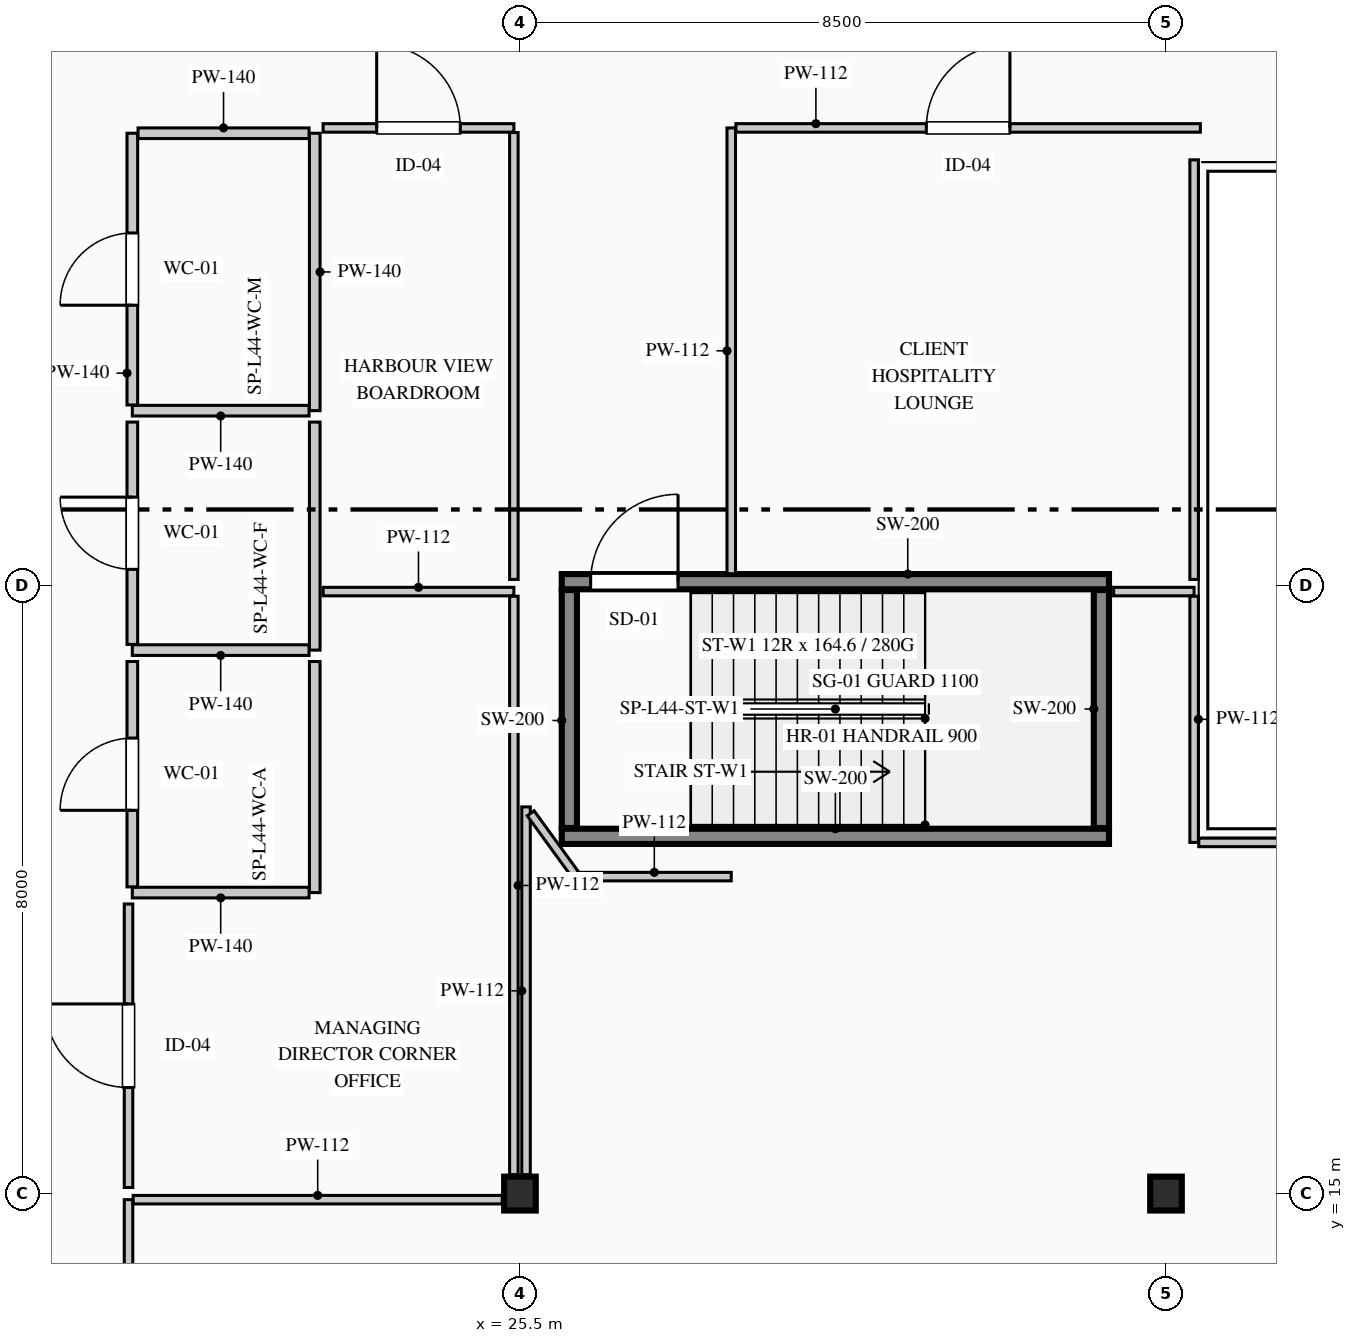
"""IFC4 building model, lengths in metres.
Left out: names, types, materials, properties, quantities, classifications, styles, units other than length and angle.
Written with IfcOpenShell. Run it as: python <this file> out.ifc"""

import sys

from ifc_helpers import new_model, si_unit, direction, frame, frame_2d, origin, origin_2d, place, context, subcontext, project, spatial, rectangle, i_section, extrude, element, fill, save


model = new_model("IFC4")
c1 = context("Model", 3, precision=1e-05, world=origin(), true_north=direction((0.0, 1.0)))
c2 = subcontext(c1, "Body", "Model", "MODEL_VIEW")
j1 = project(units=[si_unit("LENGTHUNIT", "METRE"), si_unit("PLANEANGLEUNIT", "RADIAN")], contexts=[c1])
p1 = place(None, origin())
s1 = spatial("IfcSite", under=j1, at=p1, CompositionType="ELEMENT")
p2 = place(p1, origin())
s2 = spatial("IfcBuilding", under=s1, at=p2, CompositionType="ELEMENT")
p3 = place(p2, frame((0.0, 0.0, 187.7)))
s3 = spatial("IfcBuildingStorey", under=s2, at=p3, CompositionType="ELEMENT", Elevation=187.7)
p4 = place(p3, frame((26.05, 19.7, 0.0), z_axis=(0.0, 0.0, 1.0), x_axis=(1.0, 0.0, 0.0)))
e1 = element("IfcWall", 1, at=p4, inside=s3, PredefinedType="SHEAR", context=c2, shape_type="SweptSolid", body=[
    extrude(rectangle(XDim=7.2, YDim=0.2, at=frame_2d((3.6, 0.0))), origin(), (0.0, 0.0, 1.0), 3.95),
])
p5 = place(p3, frame((26.05, 23.05, 0.0), z_axis=(0.0, 0.0, 1.0), x_axis=(1.0, 0.0, 0.0)))
e2 = element("IfcWall", 2, at=p5, inside=s3, PredefinedType="SHEAR", context=c2, shape_type="SweptSolid", body=[
    extrude(rectangle(XDim=7.2, YDim=0.2, at=frame_2d((3.6, 0.0))), origin(), (0.0, 0.0, 1.0), 3.95),
])
p6 = place(p5, frame((0.38, 0.0, 0.0)))
e3 = element("IfcOpeningElement", 3, at=p6, cuts=e2, PredefinedType="OPENING", context=c2, shape_type="SweptSolid", body=[
    extrude(rectangle(XDim=1.15, YDim=2.2, at=frame_2d((0.575, 1.1))), frame((0.0, 0.11, 0.0), z_axis=(0.0, -1.0, 0.0), x_axis=(1.0, 0.0, 0.0)), (0.0, 0.0, 1.0), 0.22),
])
for number, where, z_axis, x_axis in (
    (4, (26.15, 19.81, 0.0), (0.0, 0.0, 1.0), (0.0, 1.0, 0.0)),
    (5, (33.15, 19.81, 0.0), (0.0, 0.0, 1.0), (0.0, 1.0, 0.0)),
):
    element("IfcWall", number, at=place(p3, frame(where, z_axis=z_axis, x_axis=x_axis)), inside=s3, PredefinedType="SHEAR", context=c2, shape_type="SweptSolid", body=[
        extrude(rectangle(XDim=3.13, YDim=0.2, at=frame_2d((1.565, 0.0))), origin(), (0.0, 0.0, 1.0), 3.95),
    ])
for number, where, z_axis, x_axis in (
    (6, (25.5, 15.0, 0.0), (0.0, 0.0, 1.0), (1.0, 0.0, 0.0)),
    (7, (34.0, 15.0, 0.0), (0.0, 0.0, 1.0), (1.0, 0.0, 0.0)),
):
    element("IfcColumn", number, at=place(p3, frame(where, z_axis=z_axis, x_axis=x_axis)), inside=s3, PredefinedType="COLUMN", context=c2, shape_type="SweptSolid", body=[
        extrude(i_section(OverallWidth=0.416, OverallDepth=0.446, WebThickness=0.039, FlangeThickness=0.063, FilletRadius=0.015, at=origin_2d()), origin(), (0.0, 0.0, 1.0), 3.95),
    ])
p7 = place(p3, frame((22.8, 28.95, 0.0), z_axis=(0.0, 0.0, 1.0), x_axis=(0.0, -1.0, 0.0)))
e8 = element("IfcWall", 8, at=p7, inside=s3, PredefinedType="PARTITIONING", context=c2, shape_type="SweptSolid", body=[
    extrude(rectangle(XDim=3.65, YDim=0.14, at=frame_2d((1.825, 0.0))), origin(), (0.0, 0.0, 1.0), 3.385),
])
p8 = place(p3, frame((22.725, 25.3, 0.0), z_axis=(0.0, 0.0, 1.0), x_axis=(-1.0, 0.0, 0.0)))
e9 = element("IfcWall", 9, at=p8, inside=s3, PredefinedType="PARTITIONING", context=c2, shape_type="SweptSolid", body=[
    extrude(rectangle(XDim=2.325, YDim=0.14, at=frame_2d((1.163, 0.0))), origin(), (0.0, 0.0, 1.0), 3.7),
])
p9 = place(p3, frame((20.4, 25.375, 0.0), z_axis=(0.0, 0.0, 1.0), x_axis=(0.0, 1.0, 0.0)))
e10 = element("IfcWall", 10, at=p9, inside=s3, PredefinedType="PARTITIONING", context=c2, shape_type="SweptSolid", body=[
    extrude(rectangle(XDim=3.575, YDim=0.14, at=frame_2d((1.788, 0.0))), origin(), (0.0, 0.0, 1.0), 3.7),
])
p10 = place(p9, frame((1.312, 0.0, 0.0)))
e11 = element("IfcOpeningElement", 11, at=p10, cuts=e10, PredefinedType="OPENING", context=c2, shape_type="SweptSolid", body=[
    extrude(rectangle(XDim=0.95, YDim=2.15, at=frame_2d((0.475, 1.075))), frame((0.0, 0.08, 0.0), z_axis=(0.0, -1.0, 0.0), x_axis=(1.0, 0.0, 0.0)), (0.0, 0.0, 1.0), 0.16),
])
p11 = place(p3, frame((20.475, 28.95, 0.0), z_axis=(0.0, 0.0, 1.0), x_axis=(1.0, 0.0, 0.0)))
e12 = element("IfcWall", 12, at=p11, inside=s3, PredefinedType="PARTITIONING", context=c2, shape_type="SweptSolid", body=[
    extrude(rectangle(XDim=2.25, YDim=0.14, at=frame_2d((1.125, 0.0))), origin(), (0.0, 0.0, 1.0), 3.7),
])
p12 = place(p3, frame((22.8, 25.15, 0.0), z_axis=(0.0, 0.0, 1.0), x_axis=(0.0, -1.0, 0.0)))
e13 = element("IfcWall", 13, at=p12, inside=s3, PredefinedType="PARTITIONING", context=c2, shape_type="SweptSolid", body=[
    extrude(rectangle(XDim=3.0, YDim=0.14, at=frame_2d((1.5, 0.0))), origin(), (0.0, 0.0, 1.0), 3.385),
])
p13 = place(p3, frame((22.725, 22.15, 0.0), z_axis=(0.0, 0.0, 1.0), x_axis=(-1.0, 0.0, 0.0)))
e14 = element("IfcWall", 14, at=p13, inside=s3, PredefinedType="PARTITIONING", context=c2, shape_type="SweptSolid", body=[
    extrude(rectangle(XDim=2.325, YDim=0.14, at=frame_2d((1.163, 0.0))), origin(), (0.0, 0.0, 1.0), 3.7),
])
p14 = place(p3, frame((20.4, 22.225, 0.0), z_axis=(0.0, 0.0, 1.0), x_axis=(0.0, 1.0, 0.0)))
e15 = element("IfcWall", 15, at=p14, inside=s3, PredefinedType="PARTITIONING", context=c2, shape_type="SweptSolid", body=[
    extrude(rectangle(XDim=2.925, YDim=0.14, at=frame_2d((1.462, 0.0))), origin(), (0.0, 0.0, 1.0), 3.7),
])
p15 = place(p14, frame((0.988, 0.0, 0.0)))
e16 = element("IfcOpeningElement", 16, at=p15, cuts=e15, PredefinedType="OPENING", context=c2, shape_type="SweptSolid", body=[
    extrude(rectangle(XDim=0.95, YDim=2.15, at=frame_2d((0.475, 1.075))), frame((0.0, 0.08, 0.0), z_axis=(0.0, -1.0, 0.0), x_axis=(1.0, 0.0, 0.0)), (0.0, 0.0, 1.0), 0.16),
])
p16 = place(p3, frame((22.8, 22.0, 0.0), z_axis=(0.0, 0.0, 1.0), x_axis=(0.0, -1.0, 0.0)))
e17 = element("IfcWall", 17, at=p16, inside=s3, PredefinedType="PARTITIONING", context=c2, shape_type="SweptSolid", body=[
    extrude(rectangle(XDim=3.04, YDim=0.14, at=frame_2d((1.52, 0.0))), origin(), (0.0, 0.0, 1.0), 3.385),
])
p17 = place(p3, frame((22.725, 18.96, 0.0), z_axis=(0.0, 0.0, 1.0), x_axis=(-1.0, 0.0, 0.0)))
e18 = element("IfcWall", 18, at=p17, inside=s3, PredefinedType="PARTITIONING", context=c2, shape_type="SweptSolid", body=[
    extrude(rectangle(XDim=2.325, YDim=0.14, at=frame_2d((1.163, 0.0))), origin(), (0.0, 0.0, 1.0), 3.7),
])
p18 = place(p3, frame((20.4, 19.035, 0.0), z_axis=(0.0, 0.0, 1.0), x_axis=(0.0, 1.0, 0.0)))
e19 = element("IfcWall", 19, at=p18, inside=s3, PredefinedType="PARTITIONING", context=c2, shape_type="SweptSolid", body=[
    extrude(rectangle(XDim=2.965, YDim=0.14, at=frame_2d((1.482, 0.0))), origin(), (0.0, 0.0, 1.0), 3.7),
])
p19 = place(p18, frame((1.008, 0.0, 0.0)))
e20 = element("IfcOpeningElement", 20, at=p19, cuts=e19, PredefinedType="OPENING", context=c2, shape_type="SweptSolid", body=[
    extrude(rectangle(XDim=0.95, YDim=2.15, at=frame_2d((0.475, 1.075))), frame((0.0, 0.08, 0.0), z_axis=(0.0, -1.0, 0.0), x_axis=(1.0, 0.0, 0.0)), (0.0, 0.0, 1.0), 0.16),
])
p20 = place(p3, frame((20.35, 11.831, 0.0), z_axis=(0.0, 0.0, 1.0), x_axis=(0.0, 1.0, 0.0)))
e21 = element("IfcWall", 21, at=p20, inside=s3, PredefinedType="PARTITIONING", context=c2, shape_type="SweptSolid", body=[
    extrude(rectangle(XDim=3.089, YDim=0.112, at=frame_2d((1.544, 0.0))), origin(), (0.0, 0.0, 1.0), 3.7),
])
p21 = place(p3, frame((20.411, 14.92, 0.0), z_axis=(0.0, 0.0, 1.0), x_axis=(1.0, 0.0, 0.0)))
e22 = element("IfcWall", 22, at=p21, inside=s3, PredefinedType="PARTITIONING", context=c2, shape_type="SweptSolid", body=[
    extrude(rectangle(XDim=4.856, YDim=0.112, at=frame_2d((2.428, 0.0))), origin(), (0.0, 0.0, 1.0), 3.085),
])
p22 = place(p3, frame((25.58, 15.248, 0.0), z_axis=(0.0, 0.0, 1.0), x_axis=(0.0, 1.0, 0.0)))
e23 = element("IfcWall", 23, at=p22, inside=s3, PredefinedType="PARTITIONING", context=c2, shape_type="SweptSolid", body=[
    extrude(rectangle(XDim=4.839, YDim=0.112, at=frame_2d((2.419, 0.0))), origin(), (0.0, 0.0, 1.0), 2.885),
])
p23 = place(p3, frame((25.641, 20.003, 0.0), z_axis=(0.0, 0.0, 1.0), x_axis=(0.588143517869, -0.808756577957, 0.0)))
e24 = element("IfcWall", 24, at=p23, inside=s3, PredefinedType="PARTITIONING", context=c2, shape_type="SweptSolid", body=[
    extrude(rectangle(XDim=1.03, YDim=0.112, at=frame_2d((0.515, 0.0))), origin(), (0.0, 0.0, 1.0), 3.7),
])
p24 = place(p3, frame((26.256, 19.17, 0.0), z_axis=(0.0, 0.0, 1.0), x_axis=(1.0, 0.0, 0.0)))
e25 = element("IfcWall", 25, at=p24, inside=s3, PredefinedType="PARTITIONING", context=c2, shape_type="SweptSolid", body=[
    extrude(rectangle(XDim=2.024, YDim=0.112, at=frame_2d((1.012, 0.0))), origin(), (0.0, 0.0, 1.0), 3.385),
])
p25 = place(p3, frame((33.311, 22.92, 0.0), z_axis=(0.0, 0.0, 1.0), x_axis=(1.0, 0.0, 0.0)))
e26 = element("IfcWall", 26, at=p25, inside=s3, PredefinedType="PARTITIONING", context=c2, shape_type="SweptSolid", body=[
    extrude(rectangle(XDim=1.059, YDim=0.112, at=frame_2d((0.53, 0.0))), origin(), (0.0, 0.0, 1.0), 3.7),
])
p26 = place(p3, frame((34.37, 22.859, 0.0), z_axis=(0.0, 0.0, 1.0), x_axis=(0.0, -1.0, 0.0)))
e27 = element("IfcWall", 27, at=p26, inside=s3, PredefinedType="PARTITIONING", context=c2, shape_type="SweptSolid", body=[
    extrude(rectangle(XDim=3.239, YDim=0.112, at=frame_2d((1.619, 0.0))), origin(), (0.0, 0.0, 1.0), 3.7),
])
p27 = place(p3, frame((34.431, 19.62, 0.0), z_axis=(0.0, 0.0, 1.0), x_axis=(1.0, 0.0, 0.0)))
e28 = element("IfcWall", 28, at=p27, inside=s3, PredefinedType="PARTITIONING", context=c2, shape_type="SweptSolid", body=[
    extrude(rectangle(XDim=8.726, YDim=0.112, at=frame_2d((4.363, 0.0))), origin(), (0.0, 0.0, 1.0), 3.7),
])
p28 = place(p3, frame((22.91, 22.92, 0.0), z_axis=(0.0, 0.0, 1.0), x_axis=(1.0, 0.0, 0.0)))
e29 = element("IfcWall", 29, at=p28, inside=s3, PredefinedType="PARTITIONING", context=c2, shape_type="SweptSolid", body=[
    extrude(rectangle(XDim=2.51, YDim=0.112, at=frame_2d((1.255, 0.0))), origin(), (0.0, 0.0, 1.0), 3.7),
])
p29 = place(p3, frame((25.42, 22.859, 0.0), z_axis=(0.0, 0.0, 1.0), x_axis=(0.0, -1.0, 0.0)))
e30 = element("IfcWall", 30, at=p29, inside=s3, PredefinedType="PARTITIONING", context=c2, shape_type="SweptSolid", body=[
    extrude(rectangle(XDim=7.611, YDim=0.112, at=frame_2d((3.805, 0.0))), origin(), (0.0, 0.0, 1.0), 2.885),
])
p30 = place(p3, frame((20.35, 15.08, 0.0), z_axis=(0.0, 0.0, 1.0), x_axis=(0.0, 1.0, 0.0)))
e31 = element("IfcWall", 31, at=p30, inside=s3, PredefinedType="PARTITIONING", context=c2, shape_type="SweptSolid", body=[
    extrude(rectangle(XDim=3.73, YDim=0.112, at=frame_2d((1.865, 0.0))), origin(), (0.0, 0.0, 1.0), 3.7),
])
p31 = place(p30, frame((1.315, 0.0, 0.0)))
e32 = element("IfcOpeningElement", 32, at=p31, cuts=e31, PredefinedType="OPENING", context=c2, shape_type="SweptSolid", body=[
    extrude(rectangle(XDim=1.1, YDim=2.2, at=frame_2d((0.55, 1.1))), frame((0.0, 0.066, 0.0), z_axis=(0.0, -1.0, 0.0), x_axis=(1.0, 0.0, 0.0)), (0.0, 0.0, 1.0), 0.132),
])
p32 = place(p3, frame((22.91, 29.02, 0.0), z_axis=(0.0, 0.0, 1.0), x_axis=(1.0, 0.0, 0.0)))
e33 = element("IfcWall", 33, at=p32, inside=s3, PredefinedType="PARTITIONING", context=c2, shape_type="SweptSolid", body=[
    extrude(rectangle(XDim=2.51, YDim=0.112, at=frame_2d((1.255, 0.0))), origin(), (0.0, 0.0, 1.0), 3.7),
])
p33 = place(p32, frame((0.705, 0.0, 0.0)))
e34 = element("IfcOpeningElement", 34, at=p33, cuts=e33, PredefinedType="OPENING", context=c2, shape_type="SweptSolid", body=[
    extrude(rectangle(XDim=1.1, YDim=2.2, at=frame_2d((0.55, 1.1))), frame((0.0, 0.066, 0.0), z_axis=(0.0, -1.0, 0.0), x_axis=(1.0, 0.0, 0.0)), (0.0, 0.0, 1.0), 0.132),
])
p34 = place(p3, frame((25.42, 28.959, 0.0), z_axis=(0.0, 0.0, 1.0), x_axis=(0.0, -1.0, 0.0)))
e35 = element("IfcWall", 35, at=p34, inside=s3, PredefinedType="PARTITIONING", context=c2, shape_type="SweptSolid", body=[
    extrude(rectangle(XDim=5.879, YDim=0.112, at=frame_2d((2.939, 0.0))), origin(), (0.0, 0.0, 1.0), 2.885),
])
p35 = place(p3, frame((34.37, 28.6, 0.0), z_axis=(0.0, 0.0, 1.0), x_axis=(0.0, -1.0, 0.0)))
e36 = element("IfcWall", 36, at=p35, inside=s3, PredefinedType="PARTITIONING", context=c2, shape_type="SweptSolid", body=[
    extrude(rectangle(XDim=5.52, YDim=0.112, at=frame_2d((2.76, 0.0))), origin(), (0.0, 0.0, 1.0), 3.7),
])
p36 = place(p3, frame((28.28, 23.155, 0.0), z_axis=(0.0, 0.0, 1.0), x_axis=(0.0, 1.0, 0.0)))
e37 = element("IfcWall", 37, at=p36, inside=s3, PredefinedType="PARTITIONING", context=c2, shape_type="SweptSolid", body=[
    extrude(rectangle(XDim=5.865, YDim=0.112, at=frame_2d((2.933, 0.0))), origin(), (0.0, 0.0, 1.0), 3.7),
])
p37 = place(p3, frame((28.341, 29.02, 0.0), z_axis=(0.0, 0.0, 1.0), x_axis=(1.0, 0.0, 0.0)))
e38 = element("IfcWall", 38, at=p37, inside=s3, PredefinedType="PARTITIONING", context=c2, shape_type="SweptSolid", body=[
    extrude(rectangle(XDim=6.111, YDim=0.112, at=frame_2d((3.055, 0.0))), origin(), (0.0, 0.0, 1.0), 3.385),
])
p38 = place(p37, frame((2.506, 0.0, 0.0)))
e39 = element("IfcOpeningElement", 39, at=p38, cuts=e38, PredefinedType="OPENING", context=c2, shape_type="SweptSolid", body=[
    extrude(rectangle(XDim=1.1, YDim=2.2, at=frame_2d((0.55, 1.1))), frame((0.0, 0.066, 0.0), z_axis=(0.0, -1.0, 0.0), x_axis=(1.0, 0.0, 0.0)), (0.0, 0.0, 1.0), 0.132),
])
p39 = place(p6, origin())
e40 = element("IfcDoor", 40, at=p39, inside=s3, OperationType="SINGLE_SWING_RIGHT", PredefinedType="DOOR", context=c2, shape_type="SweptSolid", body=[
    extrude(rectangle(XDim=1.15, YDim=2.2, at=frame_2d((0.575, 1.1))), frame((0.0, 0.025, 0.0), z_axis=(0.0, -1.0, 0.0), x_axis=(1.0, 0.0, 0.0)), (0.0, 0.0, 1.0), 0.05),
])
fill(e3, e40)
p40 = place(p10, origin())
e41 = element("IfcDoor", 41, at=p40, inside=s3, OperationType="SINGLE_SWING_LEFT", PredefinedType="DOOR", context=c2, shape_type="SweptSolid", body=[
    extrude(rectangle(XDim=0.95, YDim=2.15, at=frame_2d((0.475, 1.075))), frame((0.0, 0.025, 0.0), z_axis=(0.0, -1.0, 0.0), x_axis=(1.0, 0.0, 0.0)), (0.0, 0.0, 1.0), 0.05),
])
fill(e11, e41)
p41 = place(p15, origin())
e42 = element("IfcDoor", 42, at=p41, inside=s3, OperationType="SINGLE_SWING_RIGHT", PredefinedType="DOOR", context=c2, shape_type="SweptSolid", body=[
    extrude(rectangle(XDim=0.95, YDim=2.15, at=frame_2d((0.475, 1.075))), frame((0.0, 0.025, 0.0), z_axis=(0.0, -1.0, 0.0), x_axis=(1.0, 0.0, 0.0)), (0.0, 0.0, 1.0), 0.05),
])
fill(e16, e42)
p42 = place(p19, origin())
e43 = element("IfcDoor", 43, at=p42, inside=s3, OperationType="SINGLE_SWING_LEFT", PredefinedType="DOOR", context=c2, shape_type="SweptSolid", body=[
    extrude(rectangle(XDim=0.95, YDim=2.15, at=frame_2d((0.475, 1.075))), frame((0.0, 0.025, 0.0), z_axis=(0.0, -1.0, 0.0), x_axis=(1.0, 0.0, 0.0)), (0.0, 0.0, 1.0), 0.05),
])
fill(e20, e43)
p43 = place(p31, origin())
e44 = element("IfcDoor", 44, at=p43, inside=s3, OperationType="SINGLE_SWING_RIGHT", PredefinedType="DOOR", context=c2, shape_type="SweptSolid", body=[
    extrude(rectangle(XDim=1.1, YDim=2.2, at=frame_2d((0.55, 1.1))), frame((0.0, 0.025, 0.0), z_axis=(0.0, -1.0, 0.0), x_axis=(1.0, 0.0, 0.0)), (0.0, 0.0, 1.0), 0.05),
])
fill(e32, e44)
p44 = place(p33, origin())
e45 = element("IfcDoor", 45, at=p44, inside=s3, OperationType="SINGLE_SWING_LEFT", PredefinedType="DOOR", context=c2, shape_type="SweptSolid", body=[
    extrude(rectangle(XDim=1.1, YDim=2.2, at=frame_2d((0.55, 1.1))), frame((0.0, 0.025, 0.0), z_axis=(0.0, -1.0, 0.0), x_axis=(1.0, 0.0, 0.0)), (0.0, 0.0, 1.0), 0.05),
])
fill(e34, e45)
p45 = place(p38, origin())
e46 = element("IfcDoor", 46, at=p45, inside=s3, OperationType="SINGLE_SWING_RIGHT", PredefinedType="DOOR", context=c2, shape_type="SweptSolid", body=[
    extrude(rectangle(XDim=1.1, YDim=2.2, at=frame_2d((0.55, 1.1))), frame((0.0, 0.025, 0.0), z_axis=(0.0, -1.0, 0.0), x_axis=(1.0, 0.0, 0.0)), (0.0, 0.0, 1.0), 0.05),
])
fill(e39, e46)
save(model, sys.argv[1])
